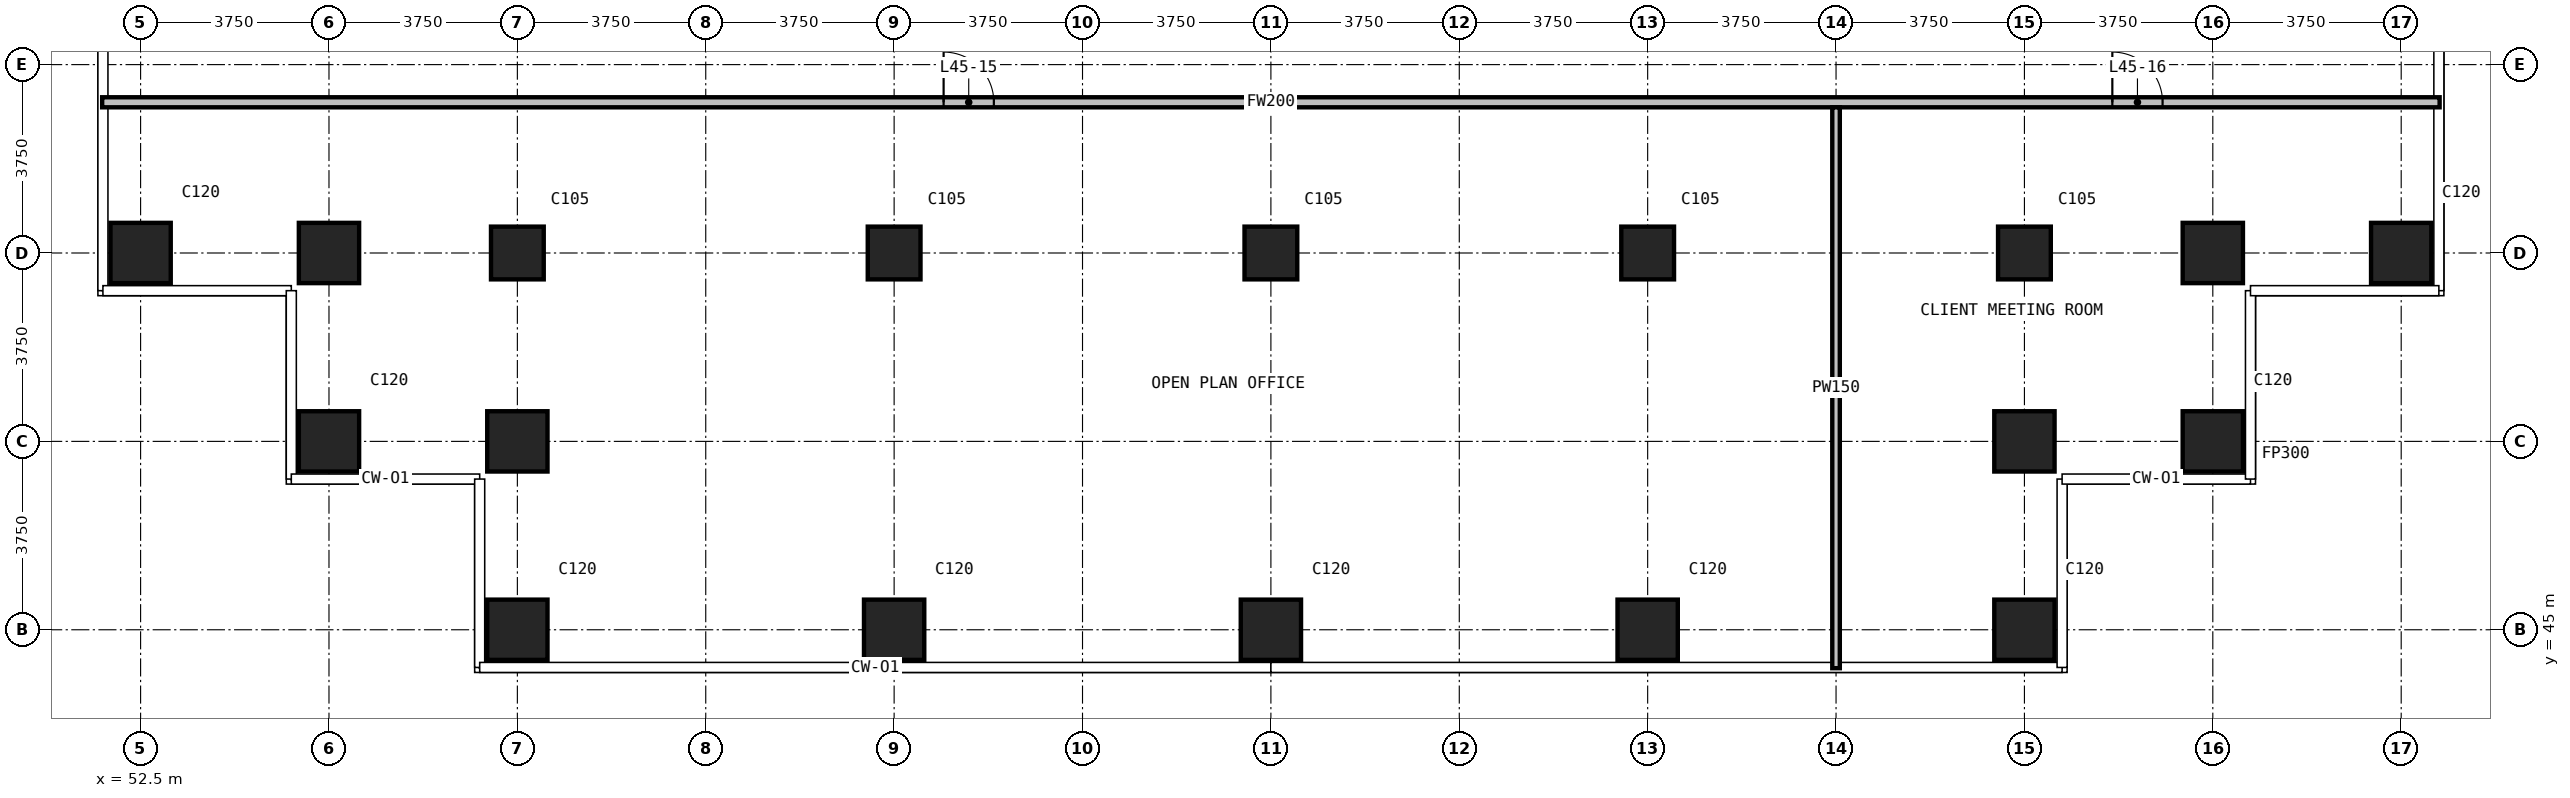
"""IFC4 building model, lengths in metres.
Left out: names, types, materials, properties, quantities, classifications, styles, units other than length and angle.
Written with IfcOpenShell. Run it as: python <this file> out.ifc"""

import sys

from ifc_helpers import new_model, si_unit, direction, frame, frame_2d, origin, origin_2d, place, context, subcontext, project, spatial, rectangle, extrude, element, fill, save


model = new_model("IFC4")
c1 = context("Model", 3, precision=1e-05, world=origin(), true_north=direction((0.0, 1.0)))
c2 = subcontext(c1, "Body", "Model", "MODEL_VIEW")
j1 = project(units=[si_unit("LENGTHUNIT", "METRE"), si_unit("PLANEANGLEUNIT", "RADIAN")], contexts=[c1])
p1 = place(None, origin())
s1 = spatial("IfcSite", under=j1, at=p1, CompositionType="ELEMENT")
p2 = place(p1, origin())
s2 = spatial("IfcBuilding", under=s1, at=p2, CompositionType="ELEMENT")
p3 = place(p2, frame((0.0, 0.0, 176.5)))
s3 = spatial("IfcBuildingStorey", under=s2, at=p3, CompositionType="ELEMENT", Elevation=176.5)
for number, where, z_axis, x_axis in (
    (1, (52.5, 52.5, 0.0), (0.0, 0.0, 1.0), (1.0, 0.0, 0.0)),
    (2, (56.25, 48.75, 0.0), (0.0, 0.0, 1.0), (1.0, 0.0, 0.0)),
    (3, (56.25, 52.5, 0.0), (0.0, 0.0, 1.0), (1.0, 0.0, 0.0)),
    (4, (60.0, 45.0, 0.0), (0.0, 0.0, 1.0), (1.0, 0.0, 0.0)),
    (5, (60.0, 48.75, 0.0), (0.0, 0.0, 1.0), (1.0, 0.0, 0.0)),
):
    element("IfcColumn", number, at=place(p3, frame(where, z_axis=z_axis, x_axis=x_axis)), inside=s3, PredefinedType="COLUMN", context=c2, shape_type="SweptSolid", body=[
        extrude(rectangle(XDim=1.2, YDim=1.2, at=origin_2d()), origin(), (0.0, 0.0, 1.0), 3.6),
    ])
p4 = place(p3, frame((60.0, 52.5, 0.0), z_axis=(0.0, 0.0, 1.0), x_axis=(1.0, 0.0, 0.0)))
e6 = element("IfcColumn", 6, at=p4, inside=s3, PredefinedType="COLUMN", context=c2, shape_type="SweptSolid", body=[
    extrude(rectangle(XDim=1.05, YDim=1.05, at=origin_2d()), origin(), (0.0, 0.0, 1.0), 3.6),
])
p5 = place(p3, frame((67.5, 45.0, 0.0), z_axis=(0.0, 0.0, 1.0), x_axis=(1.0, 0.0, 0.0)))
e7 = element("IfcColumn", 7, at=p5, inside=s3, PredefinedType="COLUMN", context=c2, shape_type="SweptSolid", body=[
    extrude(rectangle(XDim=1.2, YDim=1.2, at=origin_2d()), origin(), (0.0, 0.0, 1.0), 3.6),
])
p6 = place(p3, frame((67.5, 52.5, 0.0), z_axis=(0.0, 0.0, 1.0), x_axis=(1.0, 0.0, 0.0)))
e8 = element("IfcColumn", 8, at=p6, inside=s3, PredefinedType="COLUMN", context=c2, shape_type="SweptSolid", body=[
    extrude(rectangle(XDim=1.05, YDim=1.05, at=origin_2d()), origin(), (0.0, 0.0, 1.0), 3.6),
])
p7 = place(p3, frame((75.0, 45.0, 0.0), z_axis=(0.0, 0.0, 1.0), x_axis=(1.0, 0.0, 0.0)))
e9 = element("IfcColumn", 9, at=p7, inside=s3, PredefinedType="COLUMN", context=c2, shape_type="SweptSolid", body=[
    extrude(rectangle(XDim=1.2, YDim=1.2, at=origin_2d()), origin(), (0.0, 0.0, 1.0), 3.6),
])
p8 = place(p3, frame((75.0, 52.5, 0.0), z_axis=(0.0, 0.0, 1.0), x_axis=(1.0, 0.0, 0.0)))
e10 = element("IfcColumn", 10, at=p8, inside=s3, PredefinedType="COLUMN", context=c2, shape_type="SweptSolid", body=[
    extrude(rectangle(XDim=1.05, YDim=1.05, at=origin_2d()), origin(), (0.0, 0.0, 1.0), 3.6),
])
p9 = place(p3, frame((82.5, 45.0, 0.0), z_axis=(0.0, 0.0, 1.0), x_axis=(1.0, 0.0, 0.0)))
e11 = element("IfcColumn", 11, at=p9, inside=s3, PredefinedType="COLUMN", context=c2, shape_type="SweptSolid", body=[
    extrude(rectangle(XDim=1.2, YDim=1.2, at=origin_2d()), origin(), (0.0, 0.0, 1.0), 3.6),
])
p10 = place(p3, frame((82.5, 52.5, 0.0), z_axis=(0.0, 0.0, 1.0), x_axis=(1.0, 0.0, 0.0)))
e12 = element("IfcColumn", 12, at=p10, inside=s3, PredefinedType="COLUMN", context=c2, shape_type="SweptSolid", body=[
    extrude(rectangle(XDim=1.05, YDim=1.05, at=origin_2d()), origin(), (0.0, 0.0, 1.0), 3.6),
])
for number, where, z_axis, x_axis in (
    (13, (90.0, 45.0, 0.0), (0.0, 0.0, 1.0), (1.0, 0.0, 0.0)),
    (14, (90.0, 48.75, 0.0), (0.0, 0.0, 1.0), (1.0, 0.0, 0.0)),
):
    element("IfcColumn", number, at=place(p3, frame(where, z_axis=z_axis, x_axis=x_axis)), inside=s3, PredefinedType="COLUMN", context=c2, shape_type="SweptSolid", body=[
        extrude(rectangle(XDim=1.2, YDim=1.2, at=origin_2d()), origin(), (0.0, 0.0, 1.0), 3.6),
    ])
p11 = place(p3, frame((90.0, 52.5, 0.0), z_axis=(0.0, 0.0, 1.0), x_axis=(1.0, 0.0, 0.0)))
e15 = element("IfcColumn", 15, at=p11, inside=s3, PredefinedType="COLUMN", context=c2, shape_type="SweptSolid", body=[
    extrude(rectangle(XDim=1.05, YDim=1.05, at=origin_2d()), origin(), (0.0, 0.0, 1.0), 3.6),
])
for number, where, z_axis, x_axis in (
    (16, (93.75, 48.75, 0.0), (0.0, 0.0, 1.0), (1.0, 0.0, 0.0)),
    (17, (93.75, 52.5, 0.0), (0.0, 0.0, 1.0), (1.0, 0.0, 0.0)),
    (18, (97.5, 52.5, 0.0), (0.0, 0.0, 1.0), (1.0, 0.0, 0.0)),
):
    element("IfcColumn", number, at=place(p3, frame(where, z_axis=z_axis, x_axis=x_axis)), inside=s3, PredefinedType="COLUMN", context=c2, shape_type="SweptSolid", body=[
        extrude(rectangle(XDim=1.2, YDim=1.2, at=origin_2d()), origin(), (0.0, 0.0, 1.0), 3.6),
    ])
p12 = place(p3, frame((51.735, 55.5, 0.0), z_axis=(0.0, 0.0, 1.0), x_axis=(1.0, 0.0, 0.0)))
e19 = element("IfcWall", 19, at=p12, inside=s3, PredefinedType="PARTITIONING", context=c2, shape_type="SweptSolid", body=[
    extrude(rectangle(XDim=46.53, YDim=0.2, at=frame_2d((23.265, 0.0))), origin(), (0.0, 0.0, 1.0), 3.3),
])
p13 = place(p12, frame((16.75, 0.0, 0.0)))
e20 = element("IfcOpeningElement", 20, at=p13, cuts=e19, PredefinedType="OPENING", context=c2, shape_type="SweptSolid", body=[
    extrude(rectangle(XDim=1.0, YDim=2.2, at=frame_2d((0.5, 1.1))), frame((0.0, 0.11, 0.0), z_axis=(0.0, -1.0, 0.0), x_axis=(1.0, 0.0, 0.0)), (0.0, 0.0, 1.0), 0.22),
])
p14 = place(p12, frame((40.015, 0.0, 0.0)))
e21 = element("IfcOpeningElement", 21, at=p14, cuts=e19, PredefinedType="OPENING", context=c2, shape_type="SweptSolid", body=[
    extrude(rectangle(XDim=1.0, YDim=2.2, at=frame_2d((0.5, 1.1))), frame((0.0, 0.11, 0.0), z_axis=(0.0, -1.0, 0.0), x_axis=(1.0, 0.0, 0.0)), (0.0, 0.0, 1.0), 0.22),
])
p15 = place(p3, frame((86.25, 44.235, 0.0), z_axis=(0.0, 0.0, 1.0), x_axis=(0.0, 1.0, 0.0)))
e22 = element("IfcWall", 22, at=p15, inside=s3, PredefinedType="PARTITIONING", context=c2, shape_type="SweptSolid", body=[
    extrude(rectangle(XDim=11.165, YDim=0.15, at=frame_2d((5.583, 0.0))), origin(), (0.0, 0.0, 1.0), 3.3),
])
p16 = place(p13, origin())
e23 = element("IfcDoor", 23, at=p16, inside=s3, OperationType="SINGLE_SWING_RIGHT", PredefinedType="DOOR", context=c2, shape_type="SweptSolid", body=[
    extrude(rectangle(XDim=1.0, YDim=2.2, at=frame_2d((0.5, 1.1))), frame((0.0, 0.025, 0.0), z_axis=(0.0, -1.0, 0.0), x_axis=(1.0, 0.0, 0.0)), (0.0, 0.0, 1.0), 0.05),
])
fill(e20, e23)
p17 = place(p14, origin())
e24 = element("IfcDoor", 24, at=p17, inside=s3, OperationType="SINGLE_SWING_LEFT", PredefinedType="DOOR", context=c2, shape_type="SweptSolid", body=[
    extrude(rectangle(XDim=1.0, YDim=2.2, at=frame_2d((0.5, 1.1))), frame((0.0, 0.025, 0.0), z_axis=(0.0, -1.0, 0.0), x_axis=(1.0, 0.0, 0.0)), (0.0, 0.0, 1.0), 0.05),
])
fill(e21, e24)
save(model, sys.argv[1])
